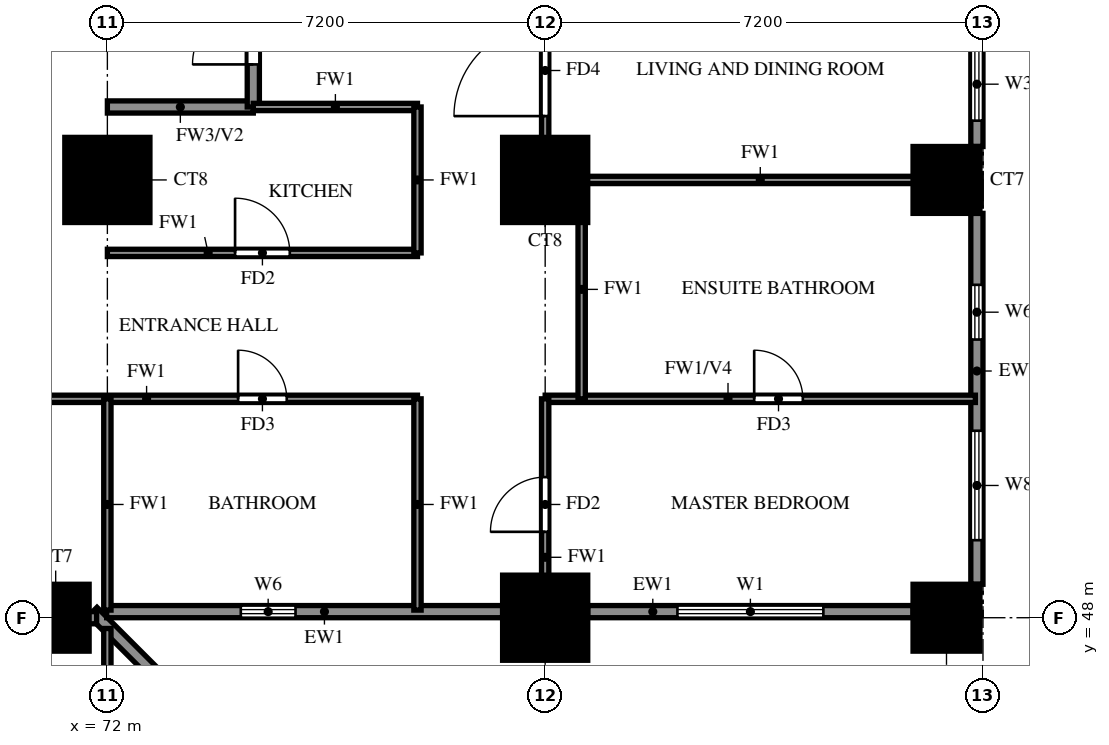
"""IFC4 building model, lengths in metres.
Left out: names, types, materials, properties, quantities, classifications, styles, units other than length and angle.
Written with IfcOpenShell. Run it as: python <this file> out.ifc"""

import sys

from ifc_helpers import new_model, si_unit, direction, frame, frame_2d, origin, origin_2d, place, context, subcontext, project, spatial, rectangle, extrude, source, transform, mapped, element, fill, save


model = new_model("IFC4")
c1 = context("Model", 3, precision=1e-05, world=origin(), true_north=direction((0.0, 1.0)))
c2 = subcontext(c1, "Body", "Model", "MODEL_VIEW")
j1 = project(units=[si_unit("LENGTHUNIT", "METRE"), si_unit("PLANEANGLEUNIT", "RADIAN")], contexts=[c1])
p1 = place(None, origin())
s1 = spatial("IfcSite", under=j1, at=p1, CompositionType="ELEMENT")
p2 = place(p1, origin())
s2 = spatial("IfcBuilding", under=s1, at=p2, CompositionType="ELEMENT")
p3 = place(p2, frame((0.0, 0.0, 55.0)))
s3 = spatial("IfcBuildingStorey", under=s2, at=p3, CompositionType="ELEMENT", Elevation=55.0)
m1 = source(origin(), c2, "Body", "SweptSolid", [
    extrude(rectangle(XDim=1.1, YDim=1.1, at=origin_2d()), origin(), (0.0, 0.0, 1.0), 3.18),
])
p4 = place(p3, frame((71.15, 48.0, 0.0), z_axis=(0.0, 0.0, 1.0), x_axis=(1.0, 0.0, 0.0)))
e1 = element("IfcColumn", 1, at=p4, inside=s3, PredefinedType="COLUMN", context=c2, shape_type="MappedRepresentation", body=[
    mapped(m1, transform((0.0, 0.0, 0.0))),
])
m2 = source(origin(), c2, "Body", "SweptSolid", [
    extrude(rectangle(XDim=1.4, YDim=1.4, at=origin_2d()), origin(), (0.0, 0.0, 1.0), 3.18),
])
p5 = place(p3, frame((79.2, 48.0, 0.0), z_axis=(0.0, 0.0, 1.0), x_axis=(1.0, 0.0, 0.0)))
e2 = element("IfcColumn", 2, at=p5, inside=s3, PredefinedType="COLUMN", context=c2, shape_type="MappedRepresentation", body=[
    mapped(m2, transform((0.0, 0.0, 0.0))),
])
p6 = place(p3, frame((85.8, 48.0, 0.0), z_axis=(0.0, 0.0, 1.0), x_axis=(1.0, 0.0, 0.0)))
e3 = element("IfcColumn", 3, at=p6, inside=s3, PredefinedType="COLUMN", context=c2, shape_type="MappedRepresentation", body=[
    mapped(m1, transform((0.0, 0.0, 0.0))),
])
for number, where, z_axis, x_axis in (
    (4, (72.0, 55.2, 0.0), (0.0, 0.0, 1.0), (1.0, 0.0, 0.0)),
    (5, (79.2, 55.2, 0.0), (0.0, 0.0, 1.0), (1.0, 0.0, 0.0)),
):
    element("IfcColumn", number, at=place(p3, frame(where, z_axis=z_axis, x_axis=x_axis)), inside=s3, PredefinedType="COLUMN", context=c2, shape_type="MappedRepresentation", body=[
        mapped(m2, transform((0.0, 0.0, 0.0))),
    ])
p7 = place(p3, frame((85.8, 55.2, 0.0), z_axis=(0.0, 0.0, 1.0), x_axis=(1.0, 0.0, 0.0)))
e6 = element("IfcColumn", 6, at=p7, inside=s3, PredefinedType="COLUMN", context=c2, shape_type="MappedRepresentation", body=[
    mapped(m1, transform((0.0, 0.0, 0.0))),
])
p8 = place(p3, frame((78.74, 41.118, 0.0), z_axis=(0.0, 0.0, 1.0), x_axis=(-0.707106781187, 0.707106781187, 0.0)))
e7 = element("IfcWall", 7, at=p8, inside=s3, PredefinedType="SOLIDWALL", context=c2, shape_type="SweptSolid", body=[
    extrude(rectangle(XDim=9.874, YDim=0.2, at=frame_2d((4.937, 0.0))), origin(), (0.0, 0.0, 1.0), 3.18),
])
p9 = place(p8, frame((2.264, 0.0, 0.6)))
e8 = element("IfcOpeningElement", 8, at=p9, cuts=e7, PredefinedType="OPENING", context=c2, shape_type="SweptSolid", body=[
    extrude(rectangle(XDim=2.4, YDim=2.4, at=frame_2d((1.2, 1.2))), frame((0.0, 0.11, 0.0), z_axis=(0.0, -1.0, 0.0), x_axis=(1.0, 0.0, 0.0)), (0.0, 0.0, 1.0), 0.22),
])
p10 = place(p8, frame((5.836, 0.0, 0.6)))
e9 = element("IfcOpeningElement", 9, at=p10, cuts=e7, PredefinedType="OPENING", context=c2, shape_type="SweptSolid", body=[
    extrude(rectangle(XDim=2.4, YDim=2.4, at=frame_2d((1.2, 1.2))), frame((0.0, 0.11, 0.0), z_axis=(0.0, -1.0, 0.0), x_axis=(1.0, 0.0, 0.0)), (0.0, 0.0, 1.0), 0.22),
])
p11 = place(p3, frame((71.989, 48.1, 0.0), z_axis=(0.0, 0.0, 1.0), x_axis=(1.0, 0.0, 0.0)))
e10 = element("IfcWall", 10, at=p11, inside=s3, PredefinedType="SOLIDWALL", context=c2, shape_type="SweptSolid", body=[
    extrude(rectangle(XDim=6.511, YDim=0.2, at=frame_2d((3.256, 0.0))), origin(), (0.0, 0.0, 1.0), 3.18),
])
p12 = place(p11, frame((2.206, 0.0, 1.5)))
e11 = element("IfcOpeningElement", 11, at=p12, cuts=e10, PredefinedType="OPENING", context=c2, shape_type="SweptSolid", body=[
    extrude(rectangle(XDim=0.9, YDim=0.9, at=frame_2d((0.45, 0.45))), frame((0.0, 0.11, 0.0), z_axis=(0.0, -1.0, 0.0), x_axis=(1.0, 0.0, 0.0)), (0.0, 0.0, 1.0), 0.22),
])
p13 = place(p3, frame((79.9, 48.1, 0.0), z_axis=(0.0, 0.0, 1.0), x_axis=(1.0, 0.0, 0.0)))
e12 = element("IfcWall", 12, at=p13, inside=s3, PredefinedType="SOLIDWALL", context=c2, shape_type="SweptSolid", body=[
    extrude(rectangle(XDim=5.35, YDim=0.2, at=frame_2d((2.675, 0.0))), origin(), (0.0, 0.0, 1.0), 3.18),
])
p14 = place(p13, frame((1.475, 0.0, 0.6)))
e13 = element("IfcOpeningElement", 13, at=p14, cuts=e12, PredefinedType="OPENING", context=c2, shape_type="SweptSolid", body=[
    extrude(rectangle(XDim=2.4, YDim=2.4, at=frame_2d((1.2, 1.2))), frame((0.0, 0.11, 0.0), z_axis=(0.0, -1.0, 0.0), x_axis=(1.0, 0.0, 0.0)), (0.0, 0.0, 1.0), 0.22),
])
p15 = place(p3, frame((86.3, 48.55, 0.0), z_axis=(0.0, 0.0, 1.0), x_axis=(0.0, 1.0, 0.0)))
e14 = element("IfcWall", 14, at=p15, inside=s3, PredefinedType="SOLIDWALL", context=c2, shape_type="SweptSolid", body=[
    extrude(rectangle(XDim=6.1, YDim=0.2, at=frame_2d((3.05, 0.0))), origin(), (0.0, 0.0, 1.0), 3.18),
])
p16 = place(p15, frame((0.725, 0.0, 0.6)))
e15 = element("IfcOpeningElement", 15, at=p16, cuts=e14, PredefinedType="OPENING", context=c2, shape_type="SweptSolid", body=[
    extrude(rectangle(XDim=1.8, YDim=2.4, at=frame_2d((0.9, 1.2))), frame((0.0, 0.11, 0.0), z_axis=(0.0, -1.0, 0.0), x_axis=(1.0, 0.0, 0.0)), (0.0, 0.0, 1.0), 0.22),
])
p17 = place(p15, frame((4.025, 0.0, 1.5)))
e16 = element("IfcOpeningElement", 16, at=p17, cuts=e14, PredefinedType="OPENING", context=c2, shape_type="SweptSolid", body=[
    extrude(rectangle(XDim=0.9, YDim=0.9, at=frame_2d((0.45, 0.45))), frame((0.0, 0.11, 0.0), z_axis=(0.0, -1.0, 0.0), x_axis=(1.0, 0.0, 0.0)), (0.0, 0.0, 1.0), 0.22),
])
p18 = place(p3, frame((86.3, 55.75, 0.0), z_axis=(0.0, 0.0, 1.0), x_axis=(0.0, 1.0, 0.0)))
e17 = element("IfcWall", 17, at=p18, inside=s3, PredefinedType="SOLIDWALL", context=c2, shape_type="SweptSolid", body=[
    extrude(rectangle(XDim=6.1, YDim=0.2, at=frame_2d((3.05, 0.0))), origin(), (0.0, 0.0, 1.0), 3.18),
])
p19 = place(p18, frame((3.95, 0.0, 0.0)))
e18 = element("IfcOpeningElement", 18, at=p19, cuts=e17, PredefinedType="OPENING", context=c2, shape_type="SweptSolid", body=[
    extrude(rectangle(XDim=1.8, YDim=2.4, at=frame_2d((0.9, 1.2))), frame((0.0, 0.11, 0.0), z_axis=(0.0, -1.0, 0.0), x_axis=(1.0, 0.0, 0.0)), (0.0, 0.0, 1.0), 0.22),
])
p20 = place(p18, frame((0.425, 0.0, 0.6)))
e19 = element("IfcOpeningElement", 19, at=p20, cuts=e17, PredefinedType="OPENING", context=c2, shape_type="SweptSolid", body=[
    extrude(rectangle(XDim=1.2, YDim=2.4, at=frame_2d((0.6, 1.2))), frame((0.0, 0.11, 0.0), z_axis=(0.0, -1.0, 0.0), x_axis=(1.0, 0.0, 0.0)), (0.0, 0.0, 1.0), 0.22),
])
p21 = place(p3, frame((72.0, 56.4, 0.0), z_axis=(0.0, 0.0, 1.0), x_axis=(1.0, 0.0, 0.0)))
e20 = element("IfcWall", 20, at=p21, inside=s3, PredefinedType="SOLIDWALL", context=c2, shape_type="SweptSolid", body=[
    extrude(rectangle(XDim=2.4, YDim=0.2, at=frame_2d((1.2, 0.0))), origin(), (0.0, 0.0, 1.0), 3.18),
])
p22 = place(p3, frame((74.4, 56.4, 0.0), z_axis=(0.0, 0.0, 1.0), x_axis=(0.0, 1.0, 0.0)))
e21 = element("IfcWall", 21, at=p22, inside=s3, PredefinedType="SOLIDWALL", context=c2, shape_type="SweptSolid", body=[
    extrude(rectangle(XDim=9.6, YDim=0.2, at=frame_2d((4.8, 0.0))), origin(), (0.0, 0.0, 1.0), 3.18),
])
p23 = place(p22, frame((0.7, 0.0, 0.0)))
e22 = element("IfcOpeningElement", 22, at=p23, cuts=e21, PredefinedType="OPENING", context=c2, shape_type="SweptSolid", body=[
    extrude(rectangle(XDim=1.0, YDim=2.1, at=frame_2d((0.5, 1.05))), frame((0.0, 0.11, 0.0), z_axis=(0.0, -1.0, 0.0), x_axis=(1.0, 0.0, 0.0)), (0.0, 0.0, 1.0), 0.22),
])
p24 = place(p22, frame((3.1, 0.0, 0.0)))
e23 = element("IfcOpeningElement", 23, at=p24, cuts=e21, PredefinedType="OPENING", context=c2, shape_type="SweptSolid", body=[
    extrude(rectangle(XDim=1.0, YDim=2.1, at=frame_2d((0.5, 1.05))), frame((0.0, 0.11, 0.0), z_axis=(0.0, -1.0, 0.0), x_axis=(1.0, 0.0, 0.0)), (0.0, 0.0, 1.0), 0.22),
])
p25 = place(p3, frame((67.2, 48.0, 0.0), z_axis=(0.0, 0.0, 1.0), x_axis=(1.0, 0.0, 0.0)))
e24 = element("IfcWall", 24, at=p25, inside=s3, PredefinedType="SOLIDWALL", context=c2, shape_type="SweptSolid", body=[
    extrude(rectangle(XDim=4.623, YDim=0.2, at=frame_2d((2.312, 0.0))), origin(), (0.0, 0.0, 1.0), 3.18),
])
p26 = place(p3, frame((67.2, 51.6, 0.0), z_axis=(0.0, 0.0, 1.0), x_axis=(1.0, 0.0, 0.0)))
e25 = element("IfcWall", 25, at=p26, inside=s3, PredefinedType="PARTITIONING", context=c2, shape_type="SweptSolid", body=[
    extrude(rectangle(XDim=9.9, YDim=0.12, at=frame_2d((4.95, 0.0))), origin(), (0.0, 0.0, 1.0), 3.18),
])
p27 = place(p26, frame((6.95, 0.0, 0.0)))
e26 = element("IfcOpeningElement", 26, at=p27, cuts=e25, PredefinedType="OPENING", context=c2, shape_type="SweptSolid", body=[
    extrude(rectangle(XDim=0.8, YDim=2.1, at=frame_2d((0.4, 1.05))), frame((0.0, 0.07, 0.0), z_axis=(0.0, -1.0, 0.0), x_axis=(1.0, 0.0, 0.0)), (0.0, 0.0, 1.0), 0.14),
])
p28 = place(p26, frame((1.95, 0.0, 0.0)))
e27 = element("IfcOpeningElement", 27, at=p28, cuts=e25, PredefinedType="OPENING", context=c2, shape_type="SweptSolid", body=[
    extrude(rectangle(XDim=0.9, YDim=2.1, at=frame_2d((0.45, 1.05))), frame((0.0, 0.07, 0.0), z_axis=(0.0, -1.0, 0.0), x_axis=(1.0, 0.0, 0.0)), (0.0, 0.0, 1.0), 0.14),
])
p29 = place(p3, frame((79.2, 51.6, 0.0), z_axis=(0.0, 0.0, 1.0), x_axis=(1.0, 0.0, 0.0)))
e28 = element("IfcWall", 28, at=p29, inside=s3, PredefinedType="PARTITIONING", context=c2, shape_type="SweptSolid", body=[
    extrude(rectangle(XDim=7.075, YDim=0.12, at=frame_2d((3.538, 0.0))), origin(), (0.0, 0.0, 1.0), 2.28),
])
p30 = place(p29, frame((3.438, 0.0, 0.0)))
e29 = element("IfcOpeningElement", 29, at=p30, cuts=e28, PredefinedType="OPENING", context=c2, shape_type="SweptSolid", body=[
    extrude(rectangle(XDim=0.8, YDim=2.1, at=frame_2d((0.4, 1.05))), frame((0.0, 0.07, 0.0), z_axis=(0.0, -1.0, 0.0), x_axis=(1.0, 0.0, 0.0)), (0.0, 0.0, 1.0), 0.14),
])
p31 = place(p3, frame((72.0, 54.0, 0.0), z_axis=(0.0, 0.0, 1.0), x_axis=(1.0, 0.0, 0.0)))
e30 = element("IfcWall", 30, at=p31, inside=s3, PredefinedType="PARTITIONING", context=c2, shape_type="SweptSolid", body=[
    extrude(rectangle(XDim=5.1, YDim=0.12, at=frame_2d((2.55, 0.0))), origin(), (0.0, 0.0, 1.0), 3.18),
])
p32 = place(p31, frame((2.1, 0.0, 0.0)))
e31 = element("IfcOpeningElement", 31, at=p32, cuts=e30, PredefinedType="OPENING", context=c2, shape_type="SweptSolid", body=[
    extrude(rectangle(XDim=0.9, YDim=2.1, at=frame_2d((0.45, 1.05))), frame((0.0, 0.07, 0.0), z_axis=(0.0, -1.0, 0.0), x_axis=(1.0, 0.0, 0.0)), (0.0, 0.0, 1.0), 0.14),
])
p33 = place(p3, frame((79.2, 55.2, 0.0), z_axis=(0.0, 0.0, 1.0), x_axis=(1.0, 0.0, 0.0)))
e32 = element("IfcWall", 32, at=p33, inside=s3, PredefinedType="PARTITIONING", context=c2, shape_type="SweptSolid", body=[
    extrude(rectangle(XDim=7.075, YDim=0.12, at=frame_2d((3.538, 0.0))), origin(), (0.0, 0.0, 1.0), 3.18),
])
p34 = place(p3, frame((74.4, 56.4, 0.0), z_axis=(0.0, 0.0, 1.0), x_axis=(1.0, 0.0, 0.0)))
e33 = element("IfcWall", 33, at=p34, inside=s3, PredefinedType="PARTITIONING", context=c2, shape_type="SweptSolid", body=[
    extrude(rectangle(XDim=2.7, YDim=0.12, at=frame_2d((1.35, 0.0))), origin(), (0.0, 0.0, 1.0), 3.18),
])
p35 = place(p3, frame((72.0, 33.725, 0.0), z_axis=(0.0, 0.0, 1.0), x_axis=(0.0, 1.0, 0.0)))
e34 = element("IfcWall", 34, at=p35, inside=s3, PredefinedType="PARTITIONING", context=c2, shape_type="SweptSolid", body=[
    extrude(rectangle(XDim=14.098, YDim=0.12, at=frame_2d((7.049, 0.0))), origin(), (0.0, 0.0, 1.0), 2.28),
])
p36 = place(p35, frame((10.075, 0.0, 0.0)))
e35 = element("IfcOpeningElement", 35, at=p36, cuts=e34, PredefinedType="OPENING", context=c2, shape_type="SweptSolid", body=[
    extrude(rectangle(XDim=0.9, YDim=2.1, at=frame_2d((0.45, 1.05))), frame((0.0, 0.07, 0.0), z_axis=(0.0, -1.0, 0.0), x_axis=(1.0, 0.0, 0.0)), (0.0, 0.0, 1.0), 0.14),
])
for number, where, z_axis, x_axis in (
    (36, (72.0, 48.125, 0.0), (0.0, 0.0, 1.0), (0.0, 1.0, 0.0)),
    (37, (77.1, 48.125, 0.0), (0.0, 0.0, 1.0), (0.0, 1.0, 0.0)),
):
    element("IfcWall", number, at=place(p3, frame(where, z_axis=z_axis, x_axis=x_axis)), inside=s3, PredefinedType="PARTITIONING", context=c2, shape_type="SweptSolid", body=[
        extrude(rectangle(XDim=3.475, YDim=0.12, at=frame_2d((1.738, 0.0))), origin(), (0.0, 0.0, 1.0), 3.18),
    ])
p37 = place(p3, frame((77.1, 54.0, 0.0), z_axis=(0.0, 0.0, 1.0), x_axis=(0.0, 1.0, 0.0)))
e38 = element("IfcWall", 38, at=p37, inside=s3, PredefinedType="PARTITIONING", context=c2, shape_type="SweptSolid", body=[
    extrude(rectangle(XDim=2.4, YDim=0.12, at=frame_2d((1.2, 0.0))), origin(), (0.0, 0.0, 1.0), 3.18),
])
p38 = place(p3, frame((79.2, 48.125, 0.0), z_axis=(0.0, 0.0, 1.0), x_axis=(0.0, 1.0, 0.0)))
e39 = element("IfcWall", 39, at=p38, inside=s3, PredefinedType="PARTITIONING", context=c2, shape_type="SweptSolid", body=[
    extrude(rectangle(XDim=3.475, YDim=0.12, at=frame_2d((1.738, 0.0))), origin(), (0.0, 0.0, 1.0), 3.18),
])
p39 = place(p38, frame((1.288, 0.0, 0.0)))
e40 = element("IfcOpeningElement", 40, at=p39, cuts=e39, PredefinedType="OPENING", context=c2, shape_type="SweptSolid", body=[
    extrude(rectangle(XDim=0.9, YDim=2.1, at=frame_2d((0.45, 1.05))), frame((0.0, 0.07, 0.0), z_axis=(0.0, -1.0, 0.0), x_axis=(1.0, 0.0, 0.0)), (0.0, 0.0, 1.0), 0.14),
])
p40 = place(p3, frame((79.2, 55.2, 0.0), z_axis=(0.0, 0.0, 1.0), x_axis=(0.0, 1.0, 0.0)))
e41 = element("IfcWall", 41, at=p40, inside=s3, PredefinedType="PARTITIONING", context=c2, shape_type="SweptSolid", body=[
    extrude(rectangle(XDim=14.4, YDim=0.12, at=frame_2d((7.2, 0.0))), origin(), (0.0, 0.0, 1.0), 3.18),
])
p41 = place(p40, frame((1.05, 0.0, 0.0)))
e42 = element("IfcOpeningElement", 42, at=p41, cuts=e41, PredefinedType="OPENING", context=c2, shape_type="SweptSolid", body=[
    extrude(rectangle(XDim=1.5, YDim=2.1, at=frame_2d((0.75, 1.05))), frame((0.0, 0.07, 0.0), z_axis=(0.0, -1.0, 0.0), x_axis=(1.0, 0.0, 0.0)), (0.0, 0.0, 1.0), 0.14),
])
p42 = place(p40, frame((4.95, 0.0, 0.0)))
e43 = element("IfcOpeningElement", 43, at=p42, cuts=e41, PredefinedType="OPENING", context=c2, shape_type="SweptSolid", body=[
    extrude(rectangle(XDim=0.9, YDim=2.1, at=frame_2d((0.45, 1.05))), frame((0.0, 0.07, 0.0), z_axis=(0.0, -1.0, 0.0), x_axis=(1.0, 0.0, 0.0)), (0.0, 0.0, 1.0), 0.14),
])
p43 = place(p40, frame((10.35, 0.0, 0.0)))
e44 = element("IfcOpeningElement", 44, at=p43, cuts=e41, PredefinedType="OPENING", context=c2, shape_type="SweptSolid", body=[
    extrude(rectangle(XDim=0.9, YDim=2.1, at=frame_2d((0.45, 1.05))), frame((0.0, 0.07, 0.0), z_axis=(0.0, -1.0, 0.0), x_axis=(1.0, 0.0, 0.0)), (0.0, 0.0, 1.0), 0.14),
])
p44 = place(p3, frame((79.8, 51.6, 0.0), z_axis=(0.0, 0.0, 1.0), x_axis=(0.0, 1.0, 0.0)))
e45 = element("IfcWall", 45, at=p44, inside=s3, PredefinedType="PARTITIONING", context=c2, shape_type="SweptSolid", body=[
    extrude(rectangle(XDim=3.6, YDim=0.12, at=frame_2d((1.8, 0.0))), origin(), (0.0, 0.0, 1.0), 3.18),
])
p45 = place(p12, origin())
e46 = element("IfcWindow", 46, at=p45, inside=s3, PartitioningType="SINGLE_PANEL", PredefinedType="WINDOW", context=c2, shape_type="SweptSolid", body=[
    extrude(rectangle(XDim=0.9, YDim=0.9, at=frame_2d((0.45, 0.45))), frame((0.0, 0.03, 0.0), z_axis=(0.0, -1.0, 0.0), x_axis=(1.0, 0.0, 0.0)), (0.0, 0.0, 1.0), 0.06),
])
fill(e11, e46)
p46 = place(p14, origin())
e47 = element("IfcWindow", 47, at=p46, inside=s3, PartitioningType="DOUBLE_PANEL_VERTICAL", PredefinedType="WINDOW", context=c2, shape_type="SweptSolid", body=[
    extrude(rectangle(XDim=2.4, YDim=2.4, at=frame_2d((1.2, 1.2))), frame((0.0, 0.03, 0.0), z_axis=(0.0, -1.0, 0.0), x_axis=(1.0, 0.0, 0.0)), (0.0, 0.0, 1.0), 0.06),
])
fill(e13, e47)
p47 = place(p16, origin())
e48 = element("IfcWindow", 48, at=p47, inside=s3, PartitioningType="DOUBLE_PANEL_VERTICAL", PredefinedType="WINDOW", context=c2, shape_type="SweptSolid", body=[
    extrude(rectangle(XDim=1.8, YDim=2.4, at=frame_2d((0.9, 1.2))), frame((0.0, 0.03, 0.0), z_axis=(0.0, -1.0, 0.0), x_axis=(1.0, 0.0, 0.0)), (0.0, 0.0, 1.0), 0.06),
])
fill(e15, e48)
p48 = place(p17, origin())
e49 = element("IfcWindow", 49, at=p48, inside=s3, PartitioningType="SINGLE_PANEL", PredefinedType="WINDOW", context=c2, shape_type="SweptSolid", body=[
    extrude(rectangle(XDim=0.9, YDim=0.9, at=frame_2d((0.45, 0.45))), frame((0.0, 0.03, 0.0), z_axis=(0.0, -1.0, 0.0), x_axis=(1.0, 0.0, 0.0)), (0.0, 0.0, 1.0), 0.06),
])
fill(e16, e49)
p49 = place(p20, origin())
e50 = element("IfcWindow", 50, at=p49, inside=s3, PartitioningType="SINGLE_PANEL", PredefinedType="WINDOW", context=c2, shape_type="SweptSolid", body=[
    extrude(rectangle(XDim=1.2, YDim=2.4, at=frame_2d((0.6, 1.2))), frame((0.0, 0.03, 0.0), z_axis=(0.0, -1.0, 0.0), x_axis=(1.0, 0.0, 0.0)), (0.0, 0.0, 1.0), 0.06),
])
fill(e19, e50)
p50 = place(p23, origin())
e51 = element("IfcDoor", 51, at=p50, inside=s3, OperationType="SINGLE_SWING_RIGHT", PredefinedType="DOOR", context=c2, shape_type="SweptSolid", body=[
    extrude(rectangle(XDim=1.0, YDim=2.1, at=frame_2d((0.5, 1.05))), frame((0.0, 0.025, 0.0), z_axis=(0.0, -1.0, 0.0), x_axis=(1.0, 0.0, 0.0)), (0.0, 0.0, 1.0), 0.05),
])
fill(e22, e51)
p51 = place(p39, origin())
e52 = element("IfcDoor", 52, at=p51, inside=s3, OperationType="SINGLE_SWING_LEFT", PredefinedType="DOOR", context=c2, shape_type="SweptSolid", body=[
    extrude(rectangle(XDim=0.9, YDim=2.1, at=frame_2d((0.45, 1.05))), frame((0.0, 0.025, 0.0), z_axis=(0.0, -1.0, 0.0), x_axis=(1.0, 0.0, 0.0)), (0.0, 0.0, 1.0), 0.05),
])
fill(e40, e52)
p52 = place(p30, origin())
e53 = element("IfcDoor", 53, at=p52, inside=s3, OperationType="SINGLE_SWING_LEFT", PredefinedType="DOOR", context=c2, shape_type="SweptSolid", body=[
    extrude(rectangle(XDim=0.8, YDim=2.1, at=frame_2d((0.4, 1.05))), frame((0.0, 0.025, 0.0), z_axis=(0.0, -1.0, 0.0), x_axis=(1.0, 0.0, 0.0)), (0.0, 0.0, 1.0), 0.05),
])
fill(e29, e53)
p53 = place(p41, origin())
e54 = element("IfcDoor", 54, at=p53, inside=s3, OperationType="SINGLE_SWING_RIGHT", PredefinedType="DOOR", context=c2, shape_type="SweptSolid", body=[
    extrude(rectangle(XDim=1.5, YDim=2.1, at=frame_2d((0.75, 1.05))), frame((0.0, 0.025, 0.0), z_axis=(0.0, -1.0, 0.0), x_axis=(1.0, 0.0, 0.0)), (0.0, 0.0, 1.0), 0.05),
])
fill(e42, e54)
p54 = place(p27, origin())
e55 = element("IfcDoor", 55, at=p54, inside=s3, OperationType="SINGLE_SWING_LEFT", PredefinedType="DOOR", context=c2, shape_type="SweptSolid", body=[
    extrude(rectangle(XDim=0.8, YDim=2.1, at=frame_2d((0.4, 1.05))), frame((0.0, 0.025, 0.0), z_axis=(0.0, -1.0, 0.0), x_axis=(1.0, 0.0, 0.0)), (0.0, 0.0, 1.0), 0.05),
])
fill(e26, e55)
p55 = place(p32, origin())
e56 = element("IfcDoor", 56, at=p55, inside=s3, OperationType="SINGLE_SWING_LEFT", PredefinedType="DOOR", context=c2, shape_type="SweptSolid", body=[
    extrude(rectangle(XDim=0.9, YDim=2.1, at=frame_2d((0.45, 1.05))), frame((0.0, 0.025, 0.0), z_axis=(0.0, -1.0, 0.0), x_axis=(1.0, 0.0, 0.0)), (0.0, 0.0, 1.0), 0.05),
])
fill(e31, e56)
save(model, sys.argv[1])
